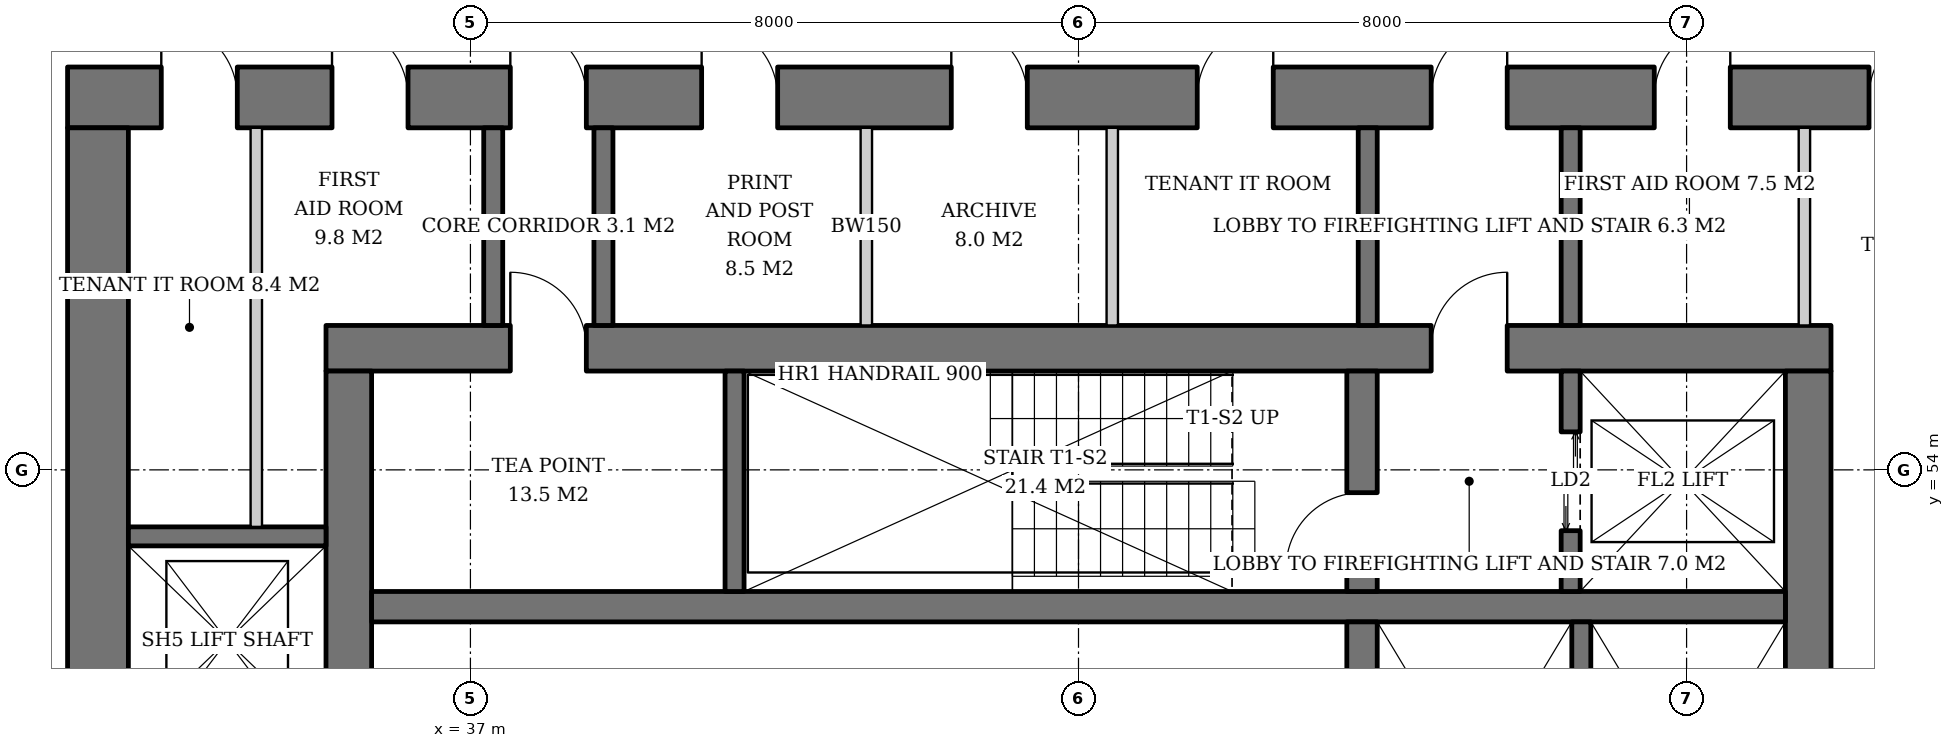
"""IFC4 building model, lengths in metres.
Left out: names, types, materials, properties, quantities, classifications, styles, units other than length and angle.
Written with IfcOpenShell. Run it as: python <this file> out.ifc"""

import sys

from ifc_helpers import new_model, si_unit, direction, frame, frame_2d, origin, place, context, subcontext, project, spatial, rectangle, extrude, element, fill, save


model = new_model("IFC4")
c1 = context("Model", 3, precision=1e-05, world=origin(), true_north=direction((0.0, 1.0)))
c2 = subcontext(c1, "Body", "Model", "MODEL_VIEW")
j1 = project(units=[si_unit("LENGTHUNIT", "METRE"), si_unit("PLANEANGLEUNIT", "RADIAN")], contexts=[c1])
p1 = place(None, origin())
s1 = spatial("IfcSite", under=j1, at=p1, CompositionType="ELEMENT")
p2 = place(p1, origin())
s2 = spatial("IfcBuilding", under=s1, at=p2, CompositionType="ELEMENT")
p3 = place(p2, frame((0.0, 0.0, 43.8)))
s3 = spatial("IfcBuildingStorey", under=s2, at=p3, CompositionType="ELEMENT", Elevation=43.8)
p4 = place(p3, frame((35.1, 55.6, 0.0), z_axis=(0.0, 0.0, 1.0), x_axis=(1.0, 0.0, 0.0)))
e1 = element("IfcWall", 1, at=p4, inside=s3, PredefinedType="SHEAR", context=c2, shape_type="SweptSolid", body=[
    extrude(rectangle(XDim=19.8, YDim=0.6, at=frame_2d((9.9, 0.0))), origin(), (0.0, 0.0, 1.0), 3.8),
])
p5 = place(p4, frame((14.54, 0.0, 0.0)))
e2 = element("IfcOpeningElement", 2, at=p5, cuts=e1, PredefinedType="OPENING", context=c2, shape_type="SweptSolid", body=[
    extrude(rectangle(XDim=1.0, YDim=2.1, at=frame_2d((0.5, 1.05))), frame((0.0, 0.31, 0.0), z_axis=(0.0, -1.0, 0.0), x_axis=(1.0, 0.0, 0.0)), (0.0, 0.0, 1.0), 0.62),
])
p6 = place(p4, frame((2.425, 0.0, 0.0)))
e3 = element("IfcOpeningElement", 3, at=p6, cuts=e1, PredefinedType="OPENING", context=c2, shape_type="SweptSolid", body=[
    extrude(rectangle(XDim=1.0, YDim=2.1, at=frame_2d((0.5, 1.05))), frame((0.0, 0.31, 0.0), z_axis=(0.0, -1.0, 0.0), x_axis=(1.0, 0.0, 0.0)), (0.0, 0.0, 1.0), 0.62),
])
p7 = place(p3, frame((35.4, 36.7, 0.0), z_axis=(0.0, 0.0, 1.0), x_axis=(0.0, 1.0, 0.0)))
e4 = element("IfcWall", 4, at=p7, inside=s3, PredefinedType="SHEAR", context=c2, shape_type="SweptSolid", body=[
    extrude(rectangle(XDim=18.6, YDim=0.6, at=frame_2d((9.3, 0.0))), origin(), (0.0, 0.0, 1.0), 3.8),
])
p8 = place(p7, frame((8.4, 0.0, 0.0)))
e5 = element("IfcOpeningElement", 5, at=p8, cuts=e4, PredefinedType="OPENING", context=c2, shape_type="SweptSolid", body=[
    extrude(rectangle(XDim=1.8, YDim=2.4, at=frame_2d((0.9, 1.2))), frame((0.0, 0.31, 0.0), z_axis=(0.0, -1.0, 0.0), x_axis=(1.0, 0.0, 0.0)), (0.0, 0.0, 1.0), 0.62),
])
p9 = place(p3, frame((54.6, 36.7, 0.0), z_axis=(0.0, 0.0, 1.0), x_axis=(0.0, 1.0, 0.0)))
e6 = element("IfcWall", 6, at=p9, inside=s3, PredefinedType="SHEAR", context=c2, shape_type="SweptSolid", body=[
    extrude(rectangle(XDim=18.6, YDim=0.6, at=frame_2d((9.3, 0.0))), origin(), (0.0, 0.0, 1.0), 3.8),
])
p10 = place(p9, frame((8.4, 0.0, 0.0)))
e7 = element("IfcOpeningElement", 7, at=p10, cuts=e6, PredefinedType="OPENING", context=c2, shape_type="SweptSolid", body=[
    extrude(rectangle(XDim=1.8, YDim=2.4, at=frame_2d((0.9, 1.2))), frame((0.0, 0.31, 0.0), z_axis=(0.0, -1.0, 0.0), x_axis=(1.0, 0.0, 0.0)), (0.0, 0.0, 1.0), 0.62),
])
p11 = place(p3, frame((31.7, 58.9, 0.0), z_axis=(0.0, 0.0, 1.0), x_axis=(1.0, 0.0, 0.0)))
e8 = element("IfcWall", 8, at=p11, inside=s3, PredefinedType="SHEAR", context=c2, shape_type="SweptSolid", body=[
    extrude(rectangle(XDim=26.6, YDim=0.8, at=frame_2d((13.3, 0.0))), origin(), (0.0, 0.0, 1.0), 3.8),
])
p12 = place(p11, frame((17.94, 0.0, 0.0)))
e9 = element("IfcOpeningElement", 9, at=p12, cuts=e8, PredefinedType="OPENING", context=c2, shape_type="SweptSolid", body=[
    extrude(rectangle(XDim=1.0, YDim=2.1, at=frame_2d((0.5, 1.05))), frame((0.0, 0.41, 0.0), z_axis=(0.0, -1.0, 0.0), x_axis=(1.0, 0.0, 0.0)), (0.0, 0.0, 1.0), 0.82),
])
p13 = place(p11, frame((5.825, 0.0, 0.0)))
e10 = element("IfcOpeningElement", 10, at=p13, cuts=e8, PredefinedType="OPENING", context=c2, shape_type="SweptSolid", body=[
    extrude(rectangle(XDim=1.0, YDim=2.1, at=frame_2d((0.5, 1.05))), frame((0.0, 0.41, 0.0), z_axis=(0.0, -1.0, 0.0), x_axis=(1.0, 0.0, 0.0)), (0.0, 0.0, 1.0), 0.82),
])
p14 = place(p11, frame((1.233, 0.0, 0.0)))
e11 = element("IfcOpeningElement", 11, at=p14, cuts=e8, PredefinedType="OPENING", context=c2, shape_type="SweptSolid", body=[
    extrude(rectangle(XDim=1.0, YDim=2.1, at=frame_2d((0.5, 1.05))), frame((0.0, 0.41, 0.0), z_axis=(0.0, -1.0, 0.0), x_axis=(1.0, 0.0, 0.0)), (0.0, 0.0, 1.0), 0.82),
])
p15 = place(p11, frame((3.479, 0.0, 0.0)))
e12 = element("IfcOpeningElement", 12, at=p15, cuts=e8, PredefinedType="OPENING", context=c2, shape_type="SweptSolid", body=[
    extrude(rectangle(XDim=1.0, YDim=2.1, at=frame_2d((0.5, 1.05))), frame((0.0, 0.41, 0.0), z_axis=(0.0, -1.0, 0.0), x_axis=(1.0, 0.0, 0.0)), (0.0, 0.0, 1.0), 0.82),
])
p16 = place(p11, frame((8.342, 0.0, 0.0)))
e13 = element("IfcOpeningElement", 13, at=p16, cuts=e8, PredefinedType="OPENING", context=c2, shape_type="SweptSolid", body=[
    extrude(rectangle(XDim=1.0, YDim=2.1, at=frame_2d((0.5, 1.05))), frame((0.0, 0.41, 0.0), z_axis=(0.0, -1.0, 0.0), x_axis=(1.0, 0.0, 0.0)), (0.0, 0.0, 1.0), 0.82),
])
p17 = place(p11, frame((11.626, 0.0, 0.0)))
e14 = element("IfcOpeningElement", 14, at=p17, cuts=e8, PredefinedType="OPENING", context=c2, shape_type="SweptSolid", body=[
    extrude(rectangle(XDim=1.0, YDim=2.1, at=frame_2d((0.5, 1.05))), frame((0.0, 0.41, 0.0), z_axis=(0.0, -1.0, 0.0), x_axis=(1.0, 0.0, 0.0)), (0.0, 0.0, 1.0), 0.82),
])
p18 = place(p11, frame((14.862, 0.0, 0.0)))
e15 = element("IfcOpeningElement", 15, at=p18, cuts=e8, PredefinedType="OPENING", context=c2, shape_type="SweptSolid", body=[
    extrude(rectangle(XDim=1.0, YDim=2.1, at=frame_2d((0.5, 1.05))), frame((0.0, 0.41, 0.0), z_axis=(0.0, -1.0, 0.0), x_axis=(1.0, 0.0, 0.0)), (0.0, 0.0, 1.0), 0.82),
])
p19 = place(p11, frame((20.875, 0.0, 0.0)))
e16 = element("IfcOpeningElement", 16, at=p19, cuts=e8, PredefinedType="OPENING", context=c2, shape_type="SweptSolid", body=[
    extrude(rectangle(XDim=1.0, YDim=2.1, at=frame_2d((0.5, 1.05))), frame((0.0, 0.41, 0.0), z_axis=(0.0, -1.0, 0.0), x_axis=(1.0, 0.0, 0.0)), (0.0, 0.0, 1.0), 0.82),
])
p20 = place(p11, frame((23.7, 0.0, 0.0)))
e17 = element("IfcOpeningElement", 17, at=p20, cuts=e8, PredefinedType="OPENING", context=c2, shape_type="SweptSolid", body=[
    extrude(rectangle(XDim=1.0, YDim=2.1, at=frame_2d((0.5, 1.05))), frame((0.0, 0.41, 0.0), z_axis=(0.0, -1.0, 0.0), x_axis=(1.0, 0.0, 0.0)), (0.0, 0.0, 1.0), 0.82),
])
p21 = place(p3, frame((32.1, 33.5, 0.0), z_axis=(0.0, 0.0, 1.0), x_axis=(0.0, 1.0, 0.0)))
e18 = element("IfcWall", 18, at=p21, inside=s3, PredefinedType="SHEAR", context=c2, shape_type="SweptSolid", body=[
    extrude(rectangle(XDim=25.0, YDim=0.8, at=frame_2d((12.5, 0.0))), origin(), (0.0, 0.0, 1.0), 3.8),
])
p22 = place(p21, frame((11.6, 0.0, 0.0)))
e19 = element("IfcOpeningElement", 19, at=p22, cuts=e18, PredefinedType="OPENING", context=c2, shape_type="SweptSolid", body=[
    extrude(rectangle(XDim=1.8, YDim=2.4, at=frame_2d((0.9, 1.2))), frame((0.0, 0.41, 0.0), z_axis=(0.0, -1.0, 0.0), x_axis=(1.0, 0.0, 0.0)), (0.0, 0.0, 1.0), 0.82),
])
p23 = place(p3, frame((35.7, 52.2, 0.0), z_axis=(0.0, 0.0, 1.0), x_axis=(1.0, 0.0, 0.0)))
e20 = element("IfcWall", 20, at=p23, inside=s3, PredefinedType="SHEAR", context=c2, shape_type="SweptSolid", body=[
    extrude(rectangle(XDim=18.6, YDim=0.4, at=frame_2d((9.3, 0.0))), origin(), (0.0, 0.0, 1.0), 3.8),
])
p24 = place(p3, frame((48.73, 40.0, 0.0), z_axis=(0.0, 0.0, 1.0), x_axis=(0.0, 1.0, 0.0)))
e21 = element("IfcWall", 21, at=p24, inside=s3, PredefinedType="SHEAR", context=c2, shape_type="SweptSolid", body=[
    extrude(rectangle(XDim=12.0, YDim=0.4, at=frame_2d((6.0, 0.0))), origin(), (0.0, 0.0, 1.0), 3.8),
])
p25 = place(p3, frame((48.73, 52.4, 0.0), z_axis=(0.0, 0.0, 1.0), x_axis=(0.0, 1.0, 0.0)))
e22 = element("IfcWall", 22, at=p25, inside=s3, PredefinedType="SHEAR", context=c2, shape_type="SweptSolid", body=[
    extrude(rectangle(XDim=2.9, YDim=0.4, at=frame_2d((1.45, 0.0))), origin(), (0.0, 0.0, 1.0), 3.8),
])
p26 = place(p25, frame((0.3, 0.0, 0.0)))
e23 = element("IfcOpeningElement", 23, at=p26, cuts=e22, PredefinedType="OPENING", context=c2, shape_type="SweptSolid", body=[
    extrude(rectangle(XDim=1.0, YDim=2.1, at=frame_2d((0.5, 1.05))), frame((0.0, 0.21, 0.0), z_axis=(0.0, -1.0, 0.0), x_axis=(1.0, 0.0, 0.0)), (0.0, 0.0, 1.0), 0.42),
])
p27 = place(p3, frame((40.475, 52.4, 0.0), z_axis=(0.0, 0.0, 1.0), x_axis=(0.0, 1.0, 0.0)))
e24 = element("IfcWall", 24, at=p27, inside=s3, PredefinedType="SHEAR", context=c2, shape_type="SweptSolid", body=[
    extrude(rectangle(XDim=2.9, YDim=0.25, at=frame_2d((1.45, 0.0))), origin(), (0.0, 0.0, 1.0), 3.8),
])
p28 = place(p3, frame((51.475, 52.4, 0.0), z_axis=(0.0, 0.0, 1.0), x_axis=(0.0, 1.0, 0.0)))
e25 = element("IfcWall", 25, at=p28, inside=s3, PredefinedType="SHEAR", context=c2, shape_type="SweptSolid", body=[
    extrude(rectangle(XDim=2.9, YDim=0.25, at=frame_2d((1.45, 0.0))), origin(), (0.0, 0.0, 1.0), 3.8),
])
p29 = place(p28, frame((0.8, 0.0, 0.0)))
e26 = element("IfcOpeningElement", 26, at=p29, cuts=e25, PredefinedType="OPENING", context=c2, shape_type="SweptSolid", body=[
    extrude(rectangle(XDim=1.3, YDim=2.2, at=frame_2d((0.65, 1.1))), frame((0.0, 0.135, 0.0), z_axis=(0.0, -1.0, 0.0), x_axis=(1.0, 0.0, 0.0)), (0.0, 0.0, 1.0), 0.27),
])
p30 = place(p3, frame((51.615, 47.75, 0.0), z_axis=(0.0, 0.0, 1.0), x_axis=(0.0, 1.0, 0.0)))
e27 = element("IfcWall", 27, at=p30, inside=s3, PredefinedType="SHEAR", context=c2, shape_type="SweptSolid", body=[
    extrude(rectangle(XDim=4.25, YDim=0.25, at=frame_2d((2.125, 0.0))), origin(), (0.0, 0.0, 1.0), 3.8),
])
p31 = place(p3, frame((32.5, 53.125, 0.0), z_axis=(0.0, 0.0, 1.0), x_axis=(1.0, 0.0, 0.0)))
e28 = element("IfcWall", 28, at=p31, inside=s3, PredefinedType="SHEAR", context=c2, shape_type="SweptSolid", body=[
    extrude(rectangle(XDim=2.6, YDim=0.25, at=frame_2d((1.3, 0.0))), origin(), (0.0, 0.0, 1.0), 3.8),
])
for number, where, z_axis, x_axis in (
    (29, (48.805, 55.9, 0.0), (0.0, 0.0, 1.0), (0.0, 1.0, 0.0)),
    (30, (51.475, 55.9, 0.0), (0.0, 0.0, 1.0), (0.0, 1.0, 0.0)),
    (31, (37.3, 55.9, 0.0), (0.0, 0.0, 1.0), (0.0, 1.0, 0.0)),
    (32, (38.75, 55.9, 0.0), (0.0, 0.0, 1.0), (0.0, 1.0, 0.0)),
):
    element("IfcWall", number, at=place(p3, frame(where, z_axis=z_axis, x_axis=x_axis)), inside=s3, PredefinedType="SOLIDWALL", context=c2, shape_type="SweptSolid", body=[
        extrude(rectangle(XDim=2.6, YDim=0.25, at=frame_2d((1.3, 0.0))), origin(), (0.0, 0.0, 1.0), 3.62),
    ])
p32 = place(p3, frame((34.183, 53.25, 0.0), z_axis=(0.0, 0.0, 1.0), x_axis=(0.0, 1.0, 0.0)))
e33 = element("IfcWall", 33, at=p32, inside=s3, PredefinedType="SOLIDWALL", context=c2, shape_type="SweptSolid", body=[
    extrude(rectangle(XDim=5.25, YDim=0.15, at=frame_2d((2.625, 0.0))), origin(), (0.0, 0.0, 1.0), 3.62),
])
for number, where, z_axis, x_axis in (
    (34, (42.209, 55.9, 0.0), (0.0, 0.0, 1.0), (0.0, 1.0, 0.0)),
    (35, (45.444, 55.9, 0.0), (0.0, 0.0, 1.0), (0.0, 1.0, 0.0)),
    (36, (54.55, 55.9, 0.0), (0.0, 0.0, 1.0), (0.0, 1.0, 0.0)),
):
    element("IfcWall", number, at=place(p3, frame(where, z_axis=z_axis, x_axis=x_axis)), inside=s3, PredefinedType="SOLIDWALL", context=c2, shape_type="SweptSolid", body=[
        extrude(rectangle(XDim=2.6, YDim=0.15, at=frame_2d((1.3, 0.0))), origin(), (0.0, 0.0, 1.0), 3.62),
    ])
p33 = place(p29, origin())
e37 = element("IfcDoor", 37, at=p33, inside=s3, OperationType="DOUBLE_DOOR_SLIDING", PredefinedType="DOOR", context=c2, shape_type="SweptSolid", body=[
    extrude(rectangle(XDim=1.3, YDim=2.2, at=frame_2d((0.65, 1.1))), frame((0.0, 0.025, 0.0), z_axis=(0.0, -1.0, 0.0), x_axis=(1.0, 0.0, 0.0)), (0.0, 0.0, 1.0), 0.05),
])
fill(e26, e37)
p34 = place(p26, origin())
e38 = element("IfcDoor", 38, at=p34, inside=s3, OperationType="SINGLE_SWING_LEFT", PredefinedType="DOOR", context=c2, shape_type="SweptSolid", body=[
    extrude(rectangle(XDim=1.0, YDim=2.1, at=frame_2d((0.5, 1.05))), frame((0.0, 0.025, 0.0), z_axis=(0.0, -1.0, 0.0), x_axis=(1.0, 0.0, 0.0)), (0.0, 0.0, 1.0), 0.05),
])
fill(e23, e38)
p35 = place(p5, origin())
e39 = element("IfcDoor", 39, at=p35, inside=s3, OperationType="SINGLE_SWING_RIGHT", PredefinedType="DOOR", context=c2, shape_type="SweptSolid", body=[
    extrude(rectangle(XDim=1.0, YDim=2.1, at=frame_2d((0.5, 1.05))), frame((0.0, 0.025, 0.0), z_axis=(0.0, -1.0, 0.0), x_axis=(1.0, 0.0, 0.0)), (0.0, 0.0, 1.0), 0.05),
])
fill(e2, e39)
p36 = place(p12, origin())
e40 = element("IfcDoor", 40, at=p36, inside=s3, OperationType="SINGLE_SWING_RIGHT", PredefinedType="DOOR", context=c2, shape_type="SweptSolid", body=[
    extrude(rectangle(XDim=1.0, YDim=2.1, at=frame_2d((0.5, 1.05))), frame((0.0, 0.025, 0.0), z_axis=(0.0, -1.0, 0.0), x_axis=(1.0, 0.0, 0.0)), (0.0, 0.0, 1.0), 0.05),
])
fill(e9, e40)
p37 = place(p13, origin())
e41 = element("IfcDoor", 41, at=p37, inside=s3, OperationType="SINGLE_SWING_LEFT", PredefinedType="DOOR", context=c2, shape_type="SweptSolid", body=[
    extrude(rectangle(XDim=1.0, YDim=2.1, at=frame_2d((0.5, 1.05))), frame((0.0, 0.025, 0.0), z_axis=(0.0, -1.0, 0.0), x_axis=(1.0, 0.0, 0.0)), (0.0, 0.0, 1.0), 0.05),
])
fill(e10, e41)
p38 = place(p6, origin())
e42 = element("IfcDoor", 42, at=p38, inside=s3, OperationType="SINGLE_SWING_LEFT", PredefinedType="DOOR", context=c2, shape_type="SweptSolid", body=[
    extrude(rectangle(XDim=1.0, YDim=2.1, at=frame_2d((0.5, 1.05))), frame((0.0, -0.24, 0.0), z_axis=(0.0, -1.0, 0.0), x_axis=(1.0, 0.0, 0.0)), (0.0, 0.0, 1.0), 0.05),
])
fill(e3, e42)
p39 = place(p14, origin())
e43 = element("IfcDoor", 43, at=p39, inside=s3, OperationType="SINGLE_SWING_LEFT", PredefinedType="DOOR", context=c2, shape_type="SweptSolid", body=[
    extrude(rectangle(XDim=1.0, YDim=2.1, at=frame_2d((0.5, 1.05))), frame((0.0, -0.34, 0.0), z_axis=(0.0, -1.0, 0.0), x_axis=(1.0, 0.0, 0.0)), (0.0, 0.0, 1.0), 0.05),
])
fill(e11, e43)
p40 = place(p15, origin())
e44 = element("IfcDoor", 44, at=p40, inside=s3, OperationType="SINGLE_SWING_LEFT", PredefinedType="DOOR", context=c2, shape_type="SweptSolid", body=[
    extrude(rectangle(XDim=1.0, YDim=2.1, at=frame_2d((0.5, 1.05))), frame((0.0, -0.34, 0.0), z_axis=(0.0, -1.0, 0.0), x_axis=(1.0, 0.0, 0.0)), (0.0, 0.0, 1.0), 0.05),
])
fill(e12, e44)
p41 = place(p16, origin())
e45 = element("IfcDoor", 45, at=p41, inside=s3, OperationType="SINGLE_SWING_LEFT", PredefinedType="DOOR", context=c2, shape_type="SweptSolid", body=[
    extrude(rectangle(XDim=1.0, YDim=2.1, at=frame_2d((0.5, 1.05))), frame((0.0, -0.34, 0.0), z_axis=(0.0, -1.0, 0.0), x_axis=(1.0, 0.0, 0.0)), (0.0, 0.0, 1.0), 0.05),
])
fill(e13, e45)
p42 = place(p17, origin())
e46 = element("IfcDoor", 46, at=p42, inside=s3, OperationType="SINGLE_SWING_LEFT", PredefinedType="DOOR", context=c2, shape_type="SweptSolid", body=[
    extrude(rectangle(XDim=1.0, YDim=2.1, at=frame_2d((0.5, 1.05))), frame((0.0, -0.34, 0.0), z_axis=(0.0, -1.0, 0.0), x_axis=(1.0, 0.0, 0.0)), (0.0, 0.0, 1.0), 0.05),
])
fill(e14, e46)
p43 = place(p18, origin())
e47 = element("IfcDoor", 47, at=p43, inside=s3, OperationType="SINGLE_SWING_RIGHT", PredefinedType="DOOR", context=c2, shape_type="SweptSolid", body=[
    extrude(rectangle(XDim=1.0, YDim=2.1, at=frame_2d((0.5, 1.05))), frame((0.0, -0.34, 0.0), z_axis=(0.0, -1.0, 0.0), x_axis=(1.0, 0.0, 0.0)), (0.0, 0.0, 1.0), 0.05),
])
fill(e15, e47)
p44 = place(p19, origin())
e48 = element("IfcDoor", 48, at=p44, inside=s3, OperationType="SINGLE_SWING_RIGHT", PredefinedType="DOOR", context=c2, shape_type="SweptSolid", body=[
    extrude(rectangle(XDim=1.0, YDim=2.1, at=frame_2d((0.5, 1.05))), frame((0.0, -0.34, 0.0), z_axis=(0.0, -1.0, 0.0), x_axis=(1.0, 0.0, 0.0)), (0.0, 0.0, 1.0), 0.05),
])
fill(e16, e48)
p45 = place(p20, origin())
e49 = element("IfcDoor", 49, at=p45, inside=s3, OperationType="SINGLE_SWING_RIGHT", PredefinedType="DOOR", context=c2, shape_type="SweptSolid", body=[
    extrude(rectangle(XDim=1.0, YDim=2.1, at=frame_2d((0.5, 1.05))), frame((0.0, -0.34, 0.0), z_axis=(0.0, -1.0, 0.0), x_axis=(1.0, 0.0, 0.0)), (0.0, 0.0, 1.0), 0.05),
])
fill(e17, e49)
save(model, sys.argv[1])
